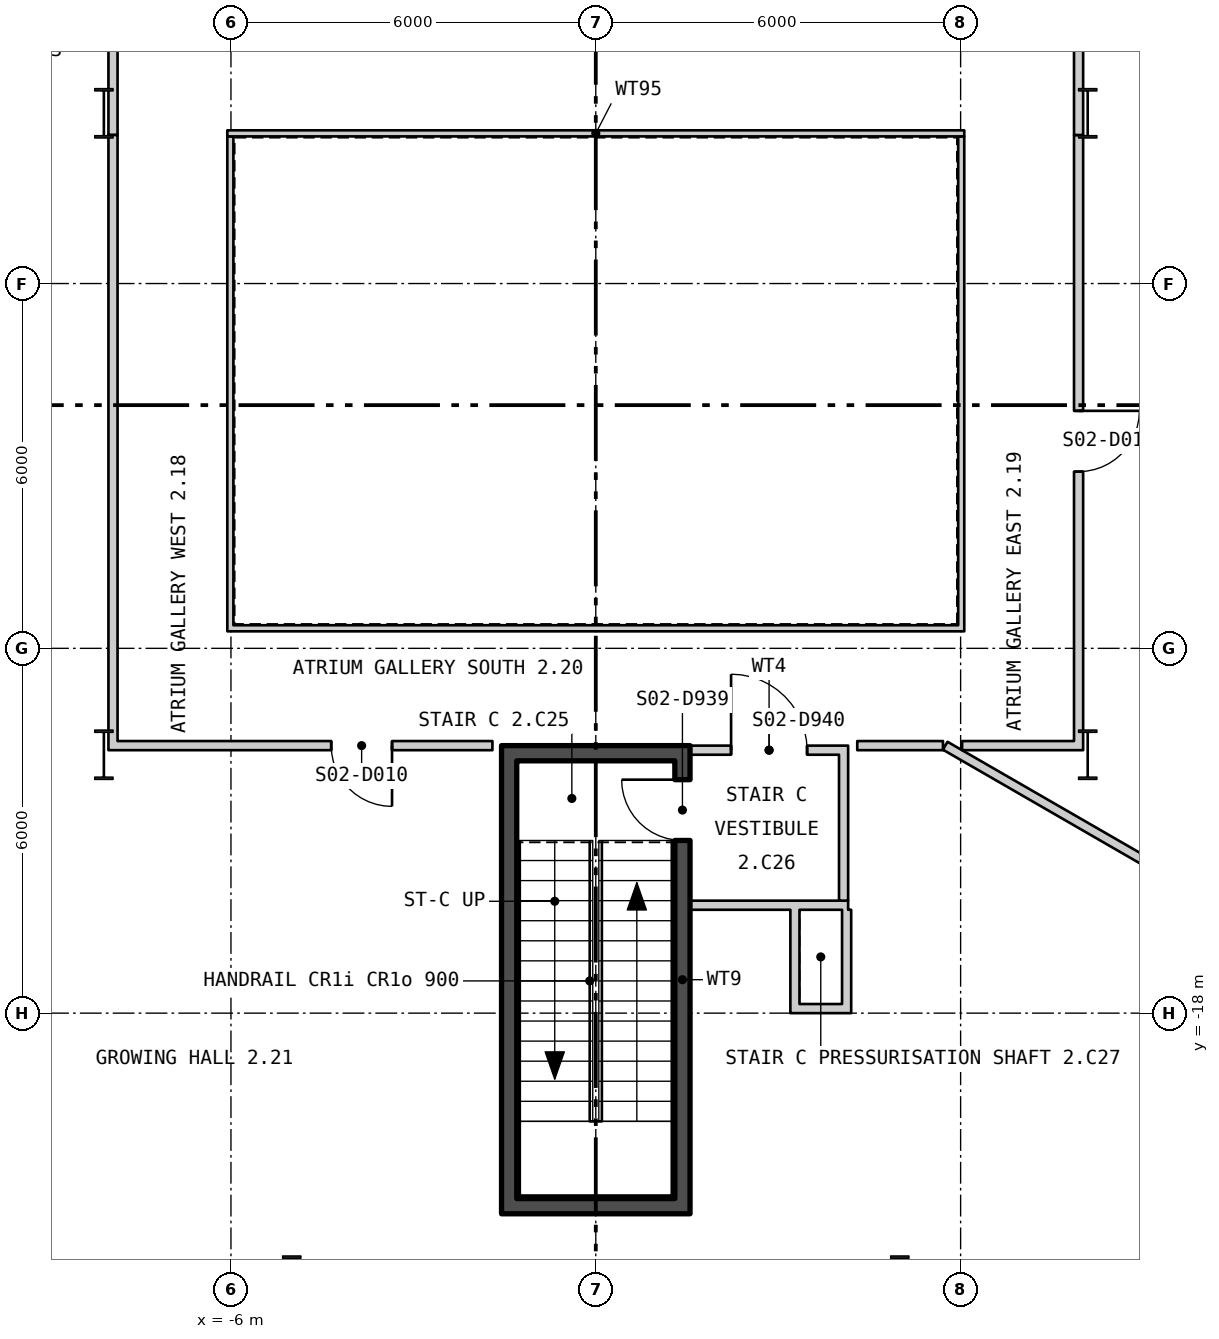
"""IFC4 building model, lengths in metres.
Left out: names, types, materials, properties, quantities, classifications, styles, units other than length and angle.
Written with IfcOpenShell. Run it as: python <this file> out.ifc"""

import sys

from ifc_helpers import new_model, si_unit, direction, frame, frame_2d, origin, origin_2d, place, context, subcontext, project, spatial, polyline, rectangle, i_section, outline, extrude, element, fill, save


model = new_model("IFC4")
c1 = context("Model", 3, precision=1e-05, world=origin(), true_north=direction((0.0, 1.0)))
c2 = subcontext(c1, "Body", "Model", "MODEL_VIEW")
j1 = project(units=[si_unit("LENGTHUNIT", "METRE"), si_unit("PLANEANGLEUNIT", "RADIAN")], contexts=[c1])
p1 = place(None, origin())
s1 = spatial("IfcSite", under=j1, at=p1, CompositionType="ELEMENT")
p2 = place(p1, origin())
s2 = spatial("IfcBuilding", under=s1, at=p2, CompositionType="ELEMENT")
p3 = place(p2, frame((0.0, 0.0, 33.3)))
s3 = spatial("IfcBuildingStorey", under=s2, at=p3, CompositionType="ELEMENT", Elevation=33.3)
for number, where, z_axis, x_axis in (
    (1, (8.09, -3.2, 0.0), (0.0, 0.0, 1.0), (1.0, 0.0, 0.0)),
    (2, (-8.09, -3.2, 0.0), (0.0, 0.0, 1.0), (1.0, 0.0, 0.0)),
    (3, (8.09, -13.75, 0.0), (0.0, 0.0, 1.0), (1.0, 0.0, 0.0)),
    (4, (-8.09, -13.75, 0.0), (0.0, 0.0, 1.0), (1.0, 0.0, 0.0)),
    (5, (5.0, -22.4, 0.0), (0.0, 0.0, 1.0), (1.0, 0.0, 0.0)),
    (6, (-5.0, -22.4, 0.0), (0.0, 0.0, 1.0), (1.0, 0.0, 0.0)),
):
    element("IfcColumn", number, at=place(p3, frame(where, z_axis=z_axis, x_axis=x_axis)), inside=s3, PredefinedType="COLUMN", context=c2, shape_type="SweptSolid", body=[
        extrude(i_section(OverallWidth=0.303, OverallDepth=0.814, WebThickness=0.021, FlangeThickness=0.04, at=origin_2d()), origin(), (0.0, 0.0, 1.0), 4.5),
    ])
p4 = place(p3, frame((-28.625, 10.015, -0.18), z_axis=(0.0, 0.0, 1.0), x_axis=(0.500000335318, -0.866025210188, 0.0)))
e7 = element("IfcWall", 7, at=p4, inside=s3, PredefinedType="SOLIDWALL", context=c2, shape_type="SweptSolid", body=[
    extrude(outline(polyline([(-0.13, -0.225), (45.88, -0.225), (45.62, 0.225), (0.13, 0.225), (-0.13, -0.225)])), origin(), (0.0, 0.0, 1.0), 4.28),
])
p5 = place(p4, frame((1.425, 0.0, 1.08)))
e8 = element("IfcOpeningElement", 8, at=p5, cuts=e7, PredefinedType="OPENING", context=c2, shape_type="SweptSolid", body=[
    extrude(rectangle(XDim=2.4, YDim=2.6, at=frame_2d((1.2, 1.3))), frame((0.0, 0.235, 0.0), z_axis=(0.0, -1.0, 0.0), x_axis=(1.0, 0.0, 0.0)), (0.0, 0.0, 1.0), 0.47),
])
p6 = place(p4, frame((5.895, 0.0, 1.08)))
e9 = element("IfcOpeningElement", 9, at=p6, cuts=e7, PredefinedType="OPENING", context=c2, shape_type="SweptSolid", body=[
    extrude(rectangle(XDim=2.4, YDim=2.6, at=frame_2d((1.2, 1.3))), frame((0.0, 0.235, 0.0), z_axis=(0.0, -1.0, 0.0), x_axis=(1.0, 0.0, 0.0)), (0.0, 0.0, 1.0), 0.47),
])
p7 = place(p4, frame((10.403, 0.0, 1.08)))
e10 = element("IfcOpeningElement", 10, at=p7, cuts=e7, PredefinedType="OPENING", context=c2, shape_type="SweptSolid", body=[
    extrude(rectangle(XDim=2.4, YDim=2.6, at=frame_2d((1.2, 1.3))), frame((0.0, 0.235, 0.0), z_axis=(0.0, -1.0, 0.0), x_axis=(1.0, 0.0, 0.0)), (0.0, 0.0, 1.0), 0.47),
])
p8 = place(p4, frame((14.912, 0.0, 1.08)))
e11 = element("IfcOpeningElement", 11, at=p8, cuts=e7, PredefinedType="OPENING", context=c2, shape_type="SweptSolid", body=[
    extrude(rectangle(XDim=2.4, YDim=2.6, at=frame_2d((1.2, 1.3))), frame((0.0, 0.235, 0.0), z_axis=(0.0, -1.0, 0.0), x_axis=(1.0, 0.0, 0.0)), (0.0, 0.0, 1.0), 0.47),
])
p9 = place(p4, frame((19.421, 0.0, 1.08)))
e12 = element("IfcOpeningElement", 12, at=p9, cuts=e7, PredefinedType="OPENING", context=c2, shape_type="SweptSolid", body=[
    extrude(rectangle(XDim=2.4, YDim=2.6, at=frame_2d((1.2, 1.3))), frame((0.0, 0.235, 0.0), z_axis=(0.0, -1.0, 0.0), x_axis=(1.0, 0.0, 0.0)), (0.0, 0.0, 1.0), 0.47),
])
p10 = place(p4, frame((23.929, 0.0, 1.08)))
e13 = element("IfcOpeningElement", 13, at=p10, cuts=e7, PredefinedType="OPENING", context=c2, shape_type="SweptSolid", body=[
    extrude(rectangle(XDim=2.4, YDim=2.6, at=frame_2d((1.2, 1.3))), frame((0.0, 0.235, 0.0), z_axis=(0.0, -1.0, 0.0), x_axis=(1.0, 0.0, 0.0)), (0.0, 0.0, 1.0), 0.47),
])
p11 = place(p4, frame((28.438, 0.0, 1.08)))
e14 = element("IfcOpeningElement", 14, at=p11, cuts=e7, PredefinedType="OPENING", context=c2, shape_type="SweptSolid", body=[
    extrude(rectangle(XDim=2.4, YDim=2.6, at=frame_2d((1.2, 1.3))), frame((0.0, 0.235, 0.0), z_axis=(0.0, -1.0, 0.0), x_axis=(1.0, 0.0, 0.0)), (0.0, 0.0, 1.0), 0.47),
])
p12 = place(p4, frame((32.947, 0.0, 1.08)))
e15 = element("IfcOpeningElement", 15, at=p12, cuts=e7, PredefinedType="OPENING", context=c2, shape_type="SweptSolid", body=[
    extrude(rectangle(XDim=2.4, YDim=2.6, at=frame_2d((1.2, 1.3))), frame((0.0, 0.235, 0.0), z_axis=(0.0, -1.0, 0.0), x_axis=(1.0, 0.0, 0.0)), (0.0, 0.0, 1.0), 0.47),
])
p13 = place(p4, frame((37.455, 0.0, 1.08)))
e16 = element("IfcOpeningElement", 16, at=p13, cuts=e7, PredefinedType="OPENING", context=c2, shape_type="SweptSolid", body=[
    extrude(rectangle(XDim=2.4, YDim=2.6, at=frame_2d((1.2, 1.3))), frame((0.0, 0.235, 0.0), z_axis=(0.0, -1.0, 0.0), x_axis=(1.0, 0.0, 0.0)), (0.0, 0.0, 1.0), 0.47),
])
p14 = place(p4, frame((41.925, 0.0, 1.08)))
e17 = element("IfcOpeningElement", 17, at=p14, cuts=e7, PredefinedType="OPENING", context=c2, shape_type="SweptSolid", body=[
    extrude(rectangle(XDim=2.4, YDim=2.6, at=frame_2d((1.2, 1.3))), frame((0.0, 0.235, 0.0), z_axis=(0.0, -1.0, 0.0), x_axis=(1.0, 0.0, 0.0)), (0.0, 0.0, 1.0), 0.47),
])
p15 = place(p3, frame((5.75, -29.605, -0.18), z_axis=(0.0, 0.0, 1.0), x_axis=(0.500000335318, 0.866025210188, 0.0)))
e18 = element("IfcWall", 18, at=p15, inside=s3, PredefinedType="SOLIDWALL", context=c2, shape_type="SweptSolid", body=[
    extrude(outline(polyline([(-0.13, -0.225), (45.88, -0.225), (45.62, 0.225), (0.13, 0.225), (-0.13, -0.225)])), origin(), (0.0, 0.0, 1.0), 4.28),
])
p16 = place(p15, frame((1.425, 0.0, 1.08)))
e19 = element("IfcOpeningElement", 19, at=p16, cuts=e18, PredefinedType="OPENING", context=c2, shape_type="SweptSolid", body=[
    extrude(rectangle(XDim=2.4, YDim=2.6, at=frame_2d((1.2, 1.3))), frame((0.0, 0.235, 0.0), z_axis=(0.0, -1.0, 0.0), x_axis=(1.0, 0.0, 0.0)), (0.0, 0.0, 1.0), 0.47),
])
p17 = place(p15, frame((5.895, 0.0, 1.08)))
e20 = element("IfcOpeningElement", 20, at=p17, cuts=e18, PredefinedType="OPENING", context=c2, shape_type="SweptSolid", body=[
    extrude(rectangle(XDim=2.4, YDim=2.6, at=frame_2d((1.2, 1.3))), frame((0.0, 0.235, 0.0), z_axis=(0.0, -1.0, 0.0), x_axis=(1.0, 0.0, 0.0)), (0.0, 0.0, 1.0), 0.47),
])
p18 = place(p15, frame((10.403, 0.0, 1.08)))
e21 = element("IfcOpeningElement", 21, at=p18, cuts=e18, PredefinedType="OPENING", context=c2, shape_type="SweptSolid", body=[
    extrude(rectangle(XDim=2.4, YDim=2.6, at=frame_2d((1.2, 1.3))), frame((0.0, 0.235, 0.0), z_axis=(0.0, -1.0, 0.0), x_axis=(1.0, 0.0, 0.0)), (0.0, 0.0, 1.0), 0.47),
])
p19 = place(p15, frame((14.912, 0.0, 1.08)))
e22 = element("IfcOpeningElement", 22, at=p19, cuts=e18, PredefinedType="OPENING", context=c2, shape_type="SweptSolid", body=[
    extrude(rectangle(XDim=2.4, YDim=2.6, at=frame_2d((1.2, 1.3))), frame((0.0, 0.235, 0.0), z_axis=(0.0, -1.0, 0.0), x_axis=(1.0, 0.0, 0.0)), (0.0, 0.0, 1.0), 0.47),
])
p20 = place(p15, frame((19.421, 0.0, 1.08)))
e23 = element("IfcOpeningElement", 23, at=p20, cuts=e18, PredefinedType="OPENING", context=c2, shape_type="SweptSolid", body=[
    extrude(rectangle(XDim=2.4, YDim=2.6, at=frame_2d((1.2, 1.3))), frame((0.0, 0.235, 0.0), z_axis=(0.0, -1.0, 0.0), x_axis=(1.0, 0.0, 0.0)), (0.0, 0.0, 1.0), 0.47),
])
p21 = place(p15, frame((23.929, 0.0, 1.08)))
e24 = element("IfcOpeningElement", 24, at=p21, cuts=e18, PredefinedType="OPENING", context=c2, shape_type="SweptSolid", body=[
    extrude(rectangle(XDim=2.4, YDim=2.6, at=frame_2d((1.2, 1.3))), frame((0.0, 0.235, 0.0), z_axis=(0.0, -1.0, 0.0), x_axis=(1.0, 0.0, 0.0)), (0.0, 0.0, 1.0), 0.47),
])
p22 = place(p15, frame((28.438, 0.0, 1.08)))
e25 = element("IfcOpeningElement", 25, at=p22, cuts=e18, PredefinedType="OPENING", context=c2, shape_type="SweptSolid", body=[
    extrude(rectangle(XDim=2.4, YDim=2.6, at=frame_2d((1.2, 1.3))), frame((0.0, 0.235, 0.0), z_axis=(0.0, -1.0, 0.0), x_axis=(1.0, 0.0, 0.0)), (0.0, 0.0, 1.0), 0.47),
])
p23 = place(p15, frame((32.947, 0.0, 1.08)))
e26 = element("IfcOpeningElement", 26, at=p23, cuts=e18, PredefinedType="OPENING", context=c2, shape_type="SweptSolid", body=[
    extrude(rectangle(XDim=2.4, YDim=2.6, at=frame_2d((1.2, 1.3))), frame((0.0, 0.235, 0.0), z_axis=(0.0, -1.0, 0.0), x_axis=(1.0, 0.0, 0.0)), (0.0, 0.0, 1.0), 0.47),
])
p24 = place(p15, frame((37.455, 0.0, 1.08)))
e27 = element("IfcOpeningElement", 27, at=p24, cuts=e18, PredefinedType="OPENING", context=c2, shape_type="SweptSolid", body=[
    extrude(rectangle(XDim=2.4, YDim=2.6, at=frame_2d((1.2, 1.3))), frame((0.0, 0.235, 0.0), z_axis=(0.0, -1.0, 0.0), x_axis=(1.0, 0.0, 0.0)), (0.0, 0.0, 1.0), 0.47),
])
p25 = place(p15, frame((41.925, 0.0, 1.08)))
e28 = element("IfcOpeningElement", 28, at=p25, cuts=e18, PredefinedType="OPENING", context=c2, shape_type="SweptSolid", body=[
    extrude(rectangle(XDim=2.4, YDim=2.6, at=frame_2d((1.2, 1.3))), frame((0.0, 0.235, 0.0), z_axis=(0.0, -1.0, 0.0), x_axis=(1.0, 0.0, 0.0)), (0.0, 0.0, 1.0), 0.47),
])
p26 = place(p3, frame((-6.06, -11.67, 0.0), z_axis=(0.0, 0.0, 1.0), x_axis=(1.0, 0.0, 0.0)))
e29 = element("IfcWall", 29, at=p26, inside=s3, PredefinedType="PARTITIONING", context=c2, shape_type="SweptSolid", body=[
    extrude(rectangle(XDim=12.12, YDim=0.1, at=frame_2d((6.06, 0.0))), origin(), (0.0, 0.0, 1.0), 4.3),
])
p27 = place(p3, frame((6.01, -11.62, 0.0), z_axis=(0.0, 0.0, 1.0), x_axis=(0.0, 1.0, 0.0)))
e30 = element("IfcWall", 30, at=p27, inside=s3, PredefinedType="PARTITIONING", context=c2, shape_type="SweptSolid", body=[
    extrude(rectangle(XDim=8.04, YDim=0.1, at=frame_2d((4.02, 0.0))), origin(), (0.0, 0.0, 1.0), 4.3),
])
p28 = place(p3, frame((6.06, -3.53, 0.0), z_axis=(0.0, 0.0, 1.0), x_axis=(-1.0, 0.0, 0.0)))
e31 = element("IfcWall", 31, at=p28, inside=s3, PredefinedType="PARTITIONING", context=c2, shape_type="SweptSolid", body=[
    extrude(rectangle(XDim=12.12, YDim=0.1, at=frame_2d((6.06, 0.0))), origin(), (0.0, 0.0, 1.0), 4.3),
])
p29 = place(p3, frame((-6.01, -3.58, 0.0), z_axis=(0.0, 0.0, 1.0), x_axis=(0.0, -1.0, 0.0)))
e32 = element("IfcWall", 32, at=p29, inside=s3, PredefinedType="PARTITIONING", context=c2, shape_type="SweptSolid", body=[
    extrude(rectangle(XDim=8.04, YDim=0.1, at=frame_2d((4.02, 0.0))), origin(), (0.0, 0.0, 1.0), 4.3),
])
p30 = place(p3, frame((-1.425, -21.05, 0.0), z_axis=(0.0, 0.0, 1.0), x_axis=(0.0, 1.0, 0.0)))
e33 = element("IfcWall", 33, at=p30, inside=s3, PredefinedType="SHEAR", context=c2, shape_type="SweptSolid", body=[
    extrude(rectangle(XDim=7.2, YDim=0.25, at=frame_2d((3.6, 0.0))), origin(), (0.0, 0.0, 1.0), 4.3),
])
p31 = place(p3, frame((1.425, -21.05, 0.0), z_axis=(0.0, 0.0, 1.0), x_axis=(0.0, 1.0, 0.0)))
e34 = element("IfcWall", 34, at=p31, inside=s3, PredefinedType="SHEAR", context=c2, shape_type="SweptSolid", body=[
    extrude(rectangle(XDim=7.2, YDim=0.25, at=frame_2d((3.6, 0.0))), origin(), (0.0, 0.0, 1.0), 4.3),
])
p32 = place(p31, frame((5.89, 0.0, 0.0)))
e35 = element("IfcOpeningElement", 35, at=p32, cuts=e34, PredefinedType="OPENING", context=c2, shape_type="SweptSolid", body=[
    extrude(rectangle(XDim=1.0, YDim=2.1, at=frame_2d((0.5, 1.05))), frame((0.0, 0.135, 0.0), z_axis=(0.0, -1.0, 0.0), x_axis=(1.0, 0.0, 0.0)), (0.0, 0.0, 1.0), 0.27),
])
for number, where, z_axis, x_axis in (
    (36, (-1.55, -21.175, 0.0), (0.0, 0.0, 1.0), (1.0, 0.0, 0.0)),
    (37, (-1.55, -13.725, 0.0), (0.0, 0.0, 1.0), (1.0, 0.0, 0.0)),
):
    element("IfcWall", number, at=place(p3, frame(where, z_axis=z_axis, x_axis=x_axis)), inside=s3, PredefinedType="SHEAR", context=c2, shape_type="SweptSolid", body=[
        extrude(rectangle(XDim=3.1, YDim=0.25, at=frame_2d((1.55, 0.0))), origin(), (0.0, 0.0, 1.0), 4.3),
    ])
p33 = place(p3, frame((1.55, -16.225, 0.0), z_axis=(0.0, 0.0, 1.0), x_axis=(1.0, 0.0, 0.0)))
e38 = element("IfcWall", 38, at=p33, inside=s3, PredefinedType="PARTITIONING", context=c2, shape_type="SweptSolid", body=[
    extrude(rectangle(XDim=2.6, YDim=0.15, at=frame_2d((1.3, 0.0))), origin(), (0.0, 0.0, 1.0), 4.3),
])
p34 = place(p3, frame((4.075, -16.15, 0.0), z_axis=(0.0, 0.0, 1.0), x_axis=(0.0, 1.0, 0.0)))
e39 = element("IfcWall", 39, at=p34, inside=s3, PredefinedType="PARTITIONING", context=c2, shape_type="SweptSolid", body=[
    extrude(rectangle(XDim=2.4, YDim=0.15, at=frame_2d((1.2, 0.0))), origin(), (0.0, 0.0, 1.0), 4.3),
])
p35 = place(p3, frame((1.55, -13.675, 0.0), z_axis=(0.0, 0.0, 1.0), x_axis=(1.0, 0.0, 0.0)))
e40 = element("IfcWall", 40, at=p35, inside=s3, PredefinedType="PARTITIONING", context=c2, shape_type="SweptSolid", body=[
    extrude(rectangle(XDim=2.6, YDim=0.15, at=frame_2d((1.3, 0.0))), origin(), (0.0, 0.0, 1.0), 3.39),
])
p36 = place(p35, frame((0.675, 0.0, 0.0)))
e41 = element("IfcOpeningElement", 41, at=p36, cuts=e40, PredefinedType="OPENING", context=c2, shape_type="SweptSolid", body=[
    extrude(rectangle(XDim=1.25, YDim=2.1, at=frame_2d((0.625, 1.05))), frame((0.0, 0.085, 0.0), z_axis=(0.0, -1.0, 0.0), x_axis=(1.0, 0.0, 0.0)), (0.0, 0.0, 1.0), 0.17),
])
p37 = place(p3, frame((3.275, -18.0, 0.0), z_axis=(0.0, 0.0, 1.0), x_axis=(0.0, 1.0, 0.0)))
e42 = element("IfcWall", 42, at=p37, inside=s3, PredefinedType="PARTITIONING", context=c2, shape_type="SweptSolid", body=[
    extrude(rectangle(XDim=1.7, YDim=0.15, at=frame_2d((0.85, 0.0))), origin(), (0.0, 0.0, 1.0), 3.7),
])
p38 = place(p3, frame((3.35, -17.925, 0.0), z_axis=(0.0, 0.0, 1.0), x_axis=(1.0, 0.0, 0.0)))
e43 = element("IfcWall", 43, at=p38, inside=s3, PredefinedType="PARTITIONING", context=c2, shape_type="SweptSolid", body=[
    extrude(rectangle(XDim=0.7, YDim=0.15, at=frame_2d((0.35, 0.0))), origin(), (0.0, 0.0, 1.0), 4.3),
])
p39 = place(p3, frame((4.125, -18.0, 0.0), z_axis=(0.0, 0.0, 1.0), x_axis=(0.0, 1.0, 0.0)))
e44 = element("IfcWall", 44, at=p39, inside=s3, PredefinedType="PARTITIONING", context=c2, shape_type="SweptSolid", body=[
    extrude(rectangle(XDim=1.7, YDim=0.15, at=frame_2d((0.85, 0.0))), origin(), (0.0, 0.0, 1.0), 4.3),
])
p40 = place(p3, frame((-7.94, -13.675, 0.0), z_axis=(0.0, 0.0, 1.0), x_axis=(0.0, 1.0, 0.0)))
e45 = element("IfcWall", 45, at=p40, inside=s3, PredefinedType="PARTITIONING", context=c2, shape_type="SweptSolid", body=[
    extrude(rectangle(XDim=10.118, YDim=0.15, at=frame_2d((5.059, 0.0))), origin(), (0.0, 0.0, 1.0), 3.61),
])
p41 = place(p3, frame((-7.94, -3.557, 0.0), z_axis=(0.0, 0.0, 1.0), x_axis=(0.0, 1.0, 0.0)))
e46 = element("IfcWall", 46, at=p41, inside=s3, PredefinedType="PARTITIONING", context=c2, shape_type="SweptSolid", body=[
    extrude(rectangle(XDim=3.557, YDim=0.15, at=frame_2d((1.778, 0.0))), origin(), (0.0, 0.0, 1.0), 4.3),
])
p42 = place(p41, frame((2.157, 0.0, 0.0)))
e47 = element("IfcOpeningElement", 47, at=p42, cuts=e46, PredefinedType="OPENING", context=c2, shape_type="SweptSolid", body=[
    extrude(rectangle(XDim=1.0, YDim=2.1, at=frame_2d((0.5, 1.05))), frame((0.0, 0.085, 0.0), z_axis=(0.0, -1.0, 0.0), x_axis=(1.0, 0.0, 0.0)), (0.0, 0.0, 1.0), 0.17),
])
p43 = place(p3, frame((-7.865, -13.6, 0.0), z_axis=(0.0, 0.0, 1.0), x_axis=(1.0, 0.0, 0.0)))
e48 = element("IfcWall", 48, at=p43, inside=s3, PredefinedType="PARTITIONING", context=c2, shape_type="SweptSolid", body=[
    extrude(rectangle(XDim=6.165, YDim=0.15, at=frame_2d((3.083, 0.0))), origin(), (0.0, 0.0, 1.0), 3.39),
])
p44 = place(p43, frame((3.514, 0.0, 0.0)))
e49 = element("IfcOpeningElement", 49, at=p44, cuts=e48, PredefinedType="OPENING", context=c2, shape_type="SweptSolid", body=[
    extrude(rectangle(XDim=1.0, YDim=2.1, at=frame_2d((0.5, 1.05))), frame((0.0, 0.085, 0.0), z_axis=(0.0, -1.0, 0.0), x_axis=(1.0, 0.0, 0.0)), (0.0, 0.0, 1.0), 0.17),
])
p45 = place(p3, frame((4.3, -13.6, 0.0), z_axis=(0.0, 0.0, 1.0), x_axis=(1.0, 0.0, 0.0)))
e50 = element("IfcWall", 50, at=p45, inside=s3, PredefinedType="PARTITIONING", context=c2, shape_type="SweptSolid", body=[
    extrude(rectangle(XDim=1.41, YDim=0.15, at=frame_2d((0.705, 0.0))), origin(), (0.0, 0.0, 1.0), 3.39),
])
p46 = place(p3, frame((5.747, -13.602, 0.0), z_axis=(0.0, 0.0, 1.0), x_axis=(0.866085627872, -0.49989567431, 0.0)))
e51 = element("IfcWall", 51, at=p46, inside=s3, PredefinedType="PARTITIONING", context=c2, shape_type="SweptSolid", body=[
    extrude(rectangle(XDim=7.33, YDim=0.15, at=frame_2d((3.665, 0.0))), origin(), (0.0, 0.0, 1.0), 4.3),
])
p47 = place(p3, frame((6.024, -13.6, 0.0), z_axis=(0.0, 0.0, 1.0), x_axis=(1.0, 0.0, 0.0)))
e52 = element("IfcWall", 52, at=p47, inside=s3, PredefinedType="PARTITIONING", context=c2, shape_type="SweptSolid", body=[
    extrude(rectangle(XDim=1.841, YDim=0.15, at=frame_2d((0.92, 0.0))), origin(), (0.0, 0.0, 1.0), 3.39),
])
p48 = place(p3, frame((7.94, -13.675, 0.0), z_axis=(0.0, 0.0, 1.0), x_axis=(0.0, 1.0, 0.0)))
e53 = element("IfcWall", 53, at=p48, inside=s3, PredefinedType="PARTITIONING", context=c2, shape_type="SweptSolid", body=[
    extrude(rectangle(XDim=10.118, YDim=0.15, at=frame_2d((5.059, 0.0))), origin(), (0.0, 0.0, 1.0), 3.61),
])
p49 = place(p48, frame((4.581, 0.0, 0.0)))
e54 = element("IfcOpeningElement", 54, at=p49, cuts=e53, PredefinedType="OPENING", context=c2, shape_type="SweptSolid", body=[
    extrude(rectangle(XDim=1.0, YDim=2.1, at=frame_2d((0.5, 1.05))), frame((0.0, 0.085, 0.0), z_axis=(0.0, -1.0, 0.0), x_axis=(1.0, 0.0, 0.0)), (0.0, 0.0, 1.0), 0.17),
])
p50 = place(p3, frame((7.94, -3.557, 0.0), z_axis=(0.0, 0.0, 1.0), x_axis=(0.0, 1.0, 0.0)))
e55 = element("IfcWall", 55, at=p50, inside=s3, PredefinedType="PARTITIONING", context=c2, shape_type="SweptSolid", body=[
    extrude(rectangle(XDim=1.768, YDim=0.15, at=frame_2d((0.884, 0.0))), origin(), (0.0, 0.0, 1.0), 4.3),
])
p51 = place(p32, origin())
e56 = element("IfcDoor", 56, at=p51, inside=s3, OperationType="SINGLE_SWING_LEFT", PredefinedType="DOOR", context=c2, shape_type="SweptSolid", body=[
    extrude(rectangle(XDim=1.0, YDim=2.1, at=frame_2d((0.5, 1.05))), frame((0.0, 0.025, 0.0), z_axis=(0.0, -1.0, 0.0), x_axis=(1.0, 0.0, 0.0)), (0.0, 0.0, 1.0), 0.05),
])
fill(e35, e56)
p52 = place(p36, origin())
e57 = element("IfcDoor", 57, at=p52, inside=s3, OperationType="SINGLE_SWING_RIGHT", PredefinedType="DOOR", context=c2, shape_type="SweptSolid", body=[
    extrude(rectangle(XDim=1.25, YDim=2.1, at=frame_2d((0.625, 1.05))), frame((0.0, 0.025, 0.0), z_axis=(0.0, -1.0, 0.0), x_axis=(1.0, 0.0, 0.0)), (0.0, 0.0, 1.0), 0.05),
])
fill(e41, e57)
p53 = place(p44, origin())
e58 = element("IfcDoor", 58, at=p53, inside=s3, OperationType="SINGLE_SWING_RIGHT", PredefinedType="DOOR", context=c2, shape_type="SweptSolid", body=[
    extrude(rectangle(XDim=1.0, YDim=2.1, at=frame_2d((0.5, 1.05))), frame((0.0, 0.025, 0.0), z_axis=(0.0, -1.0, 0.0), x_axis=(1.0, 0.0, 0.0)), (0.0, 0.0, 1.0), 0.05),
])
fill(e49, e58)
p54 = place(p49, origin())
e59 = element("IfcDoor", 59, at=p54, inside=s3, OperationType="SINGLE_SWING_RIGHT", PredefinedType="DOOR", context=c2, shape_type="SweptSolid", body=[
    extrude(rectangle(XDim=1.0, YDim=2.1, at=frame_2d((0.5, 1.05))), frame((0.0, 0.025, 0.0), z_axis=(0.0, -1.0, 0.0), x_axis=(1.0, 0.0, 0.0)), (0.0, 0.0, 1.0), 0.05),
])
fill(e54, e59)
save(model, sys.argv[1])
